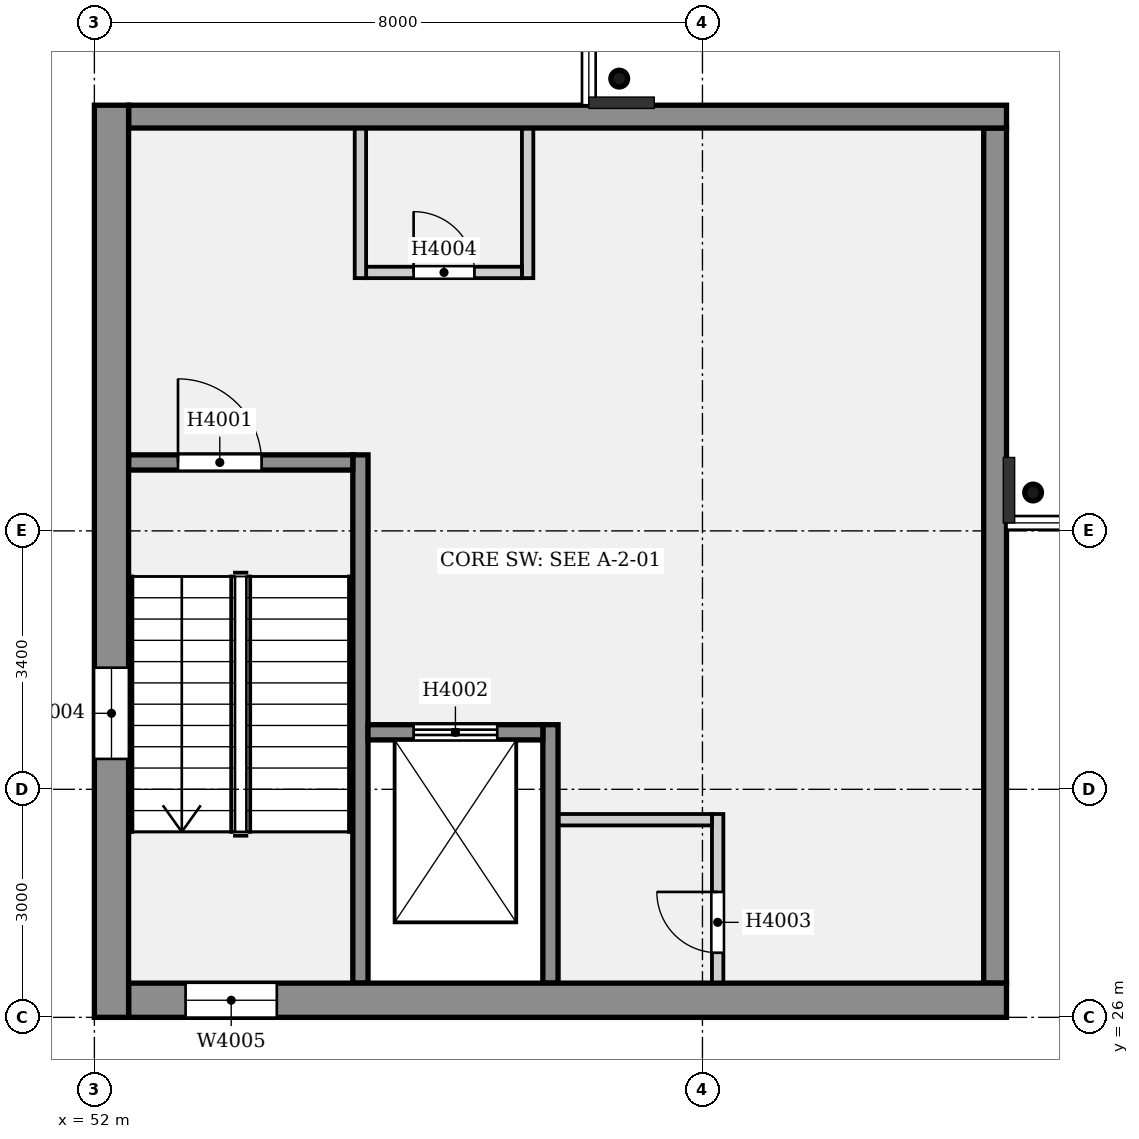
"""IFC4 building model, lengths in metres.
Left out: names, types, materials, properties, quantities, classifications, styles, units other than length and angle.
Written with IfcOpenShell. Run it as: python <this file> out.ifc"""

import sys

from ifc_helpers import new_model, si_unit, direction, frame, frame_2d, origin, origin_2d, place, context, subcontext, project, spatial, rectangle, hollow_circle, extrude, element, fill, save


model = new_model("IFC4")
c1 = context("Model", 3, precision=1e-05, world=origin(), true_north=direction((0.0, 1.0)))
c2 = subcontext(c1, "Body", "Model", "MODEL_VIEW")
j1 = project(units=[si_unit("LENGTHUNIT", "METRE"), si_unit("PLANEANGLEUNIT", "RADIAN")], contexts=[c1])
p1 = place(None, origin())
s1 = spatial("IfcSite", under=j1, at=p1, CompositionType="ELEMENT")
p2 = place(p1, origin())
s2 = spatial("IfcBuilding", under=s1, at=p2, CompositionType="ELEMENT")
p3 = place(p2, frame((0.0, 0.0, 18.2)))
s3 = spatial("IfcBuildingStorey", under=s2, at=p3, CompositionType="ELEMENT", Elevation=18.2)
p4 = place(p3, frame((52.225, 26.0, 0.0), z_axis=(0.0, 0.0, 1.0), x_axis=(0.0, 1.0, 0.0)))
e1 = element("IfcWall", 1, at=p4, inside=s3, PredefinedType="ELEMENTEDWALL", context=c2, shape_type="SweptSolid", body=[
    extrude(rectangle(XDim=12.0, YDim=0.45, at=frame_2d((6.0, 0.0))), origin(), (0.0, 0.0, 1.0), 4.4),
])
p5 = place(p4, frame((3.4, 0.0, 0.6)))
e2 = element("IfcOpeningElement", 2, at=p5, cuts=e1, PredefinedType="OPENING", context=c2, shape_type="SweptSolid", body=[
    extrude(rectangle(XDim=1.2, YDim=3.0, at=frame_2d((0.6, 1.5))), frame((0.0, 0.235, 0.0), z_axis=(0.0, -1.0, 0.0), x_axis=(1.0, 0.0, 0.0)), (0.0, 0.0, 1.0), 0.47),
])
p6 = place(p3, frame((52.45, 26.225, 0.0), z_axis=(0.0, 0.0, 1.0), x_axis=(1.0, 0.0, 0.0)))
e3 = element("IfcWall", 3, at=p6, inside=s3, PredefinedType="ELEMENTEDWALL", context=c2, shape_type="SweptSolid", body=[
    extrude(rectangle(XDim=11.55, YDim=0.45, at=frame_2d((5.775, 0.0))), origin(), (0.0, 0.0, 1.0), 4.4),
])
p7 = place(p6, frame((0.75, 0.0, 0.6)))
e4 = element("IfcOpeningElement", 4, at=p7, cuts=e3, PredefinedType="OPENING", context=c2, shape_type="SweptSolid", body=[
    extrude(rectangle(XDim=1.2, YDim=3.0, at=frame_2d((0.6, 1.5))), frame((0.0, 0.235, 0.0), z_axis=(0.0, -1.0, 0.0), x_axis=(1.0, 0.0, 0.0)), (0.0, 0.0, 1.0), 0.47),
])
p8 = place(p3, frame((63.85, 26.45, 0.0), z_axis=(0.0, 0.0, 1.0), x_axis=(0.0, 1.0, 0.0)))
e5 = element("IfcWall", 5, at=p8, inside=s3, PredefinedType="SOLIDWALL", context=c2, shape_type="SweptSolid", body=[
    extrude(rectangle(XDim=11.25, YDim=0.3, at=frame_2d((5.625, 0.0))), origin(), (0.0, 0.0, 1.0), 4.4),
])
p9 = place(p3, frame((52.45, 37.85, 0.0), z_axis=(0.0, 0.0, 1.0), x_axis=(1.0, 0.0, 0.0)))
e6 = element("IfcWall", 6, at=p9, inside=s3, PredefinedType="SOLIDWALL", context=c2, shape_type="SweptSolid", body=[
    extrude(rectangle(XDim=11.55, YDim=0.3, at=frame_2d((5.775, 0.0))), origin(), (0.0, 0.0, 1.0), 4.4),
])
for number, where, z_axis, x_axis in (
    (7, (64.35, 32.905, 0.0), (0.0, 0.199, 0.98), (-1.0, 0.0, 0.0)),
    (8, (58.905, 38.35, 0.0), (0.199, 0.0, 0.98), (0.0, 1.0, 0.0)),
):
    element("IfcColumn", number, at=place(p3, frame(where, z_axis=z_axis, x_axis=x_axis)), inside=s3, PredefinedType="COLUMN", context=c2, shape_type="SweptSolid", body=[
        extrude(hollow_circle(Radius=0.11, WallThickness=0.013, at=origin_2d()), origin(), (0.0, 0.0, 1.0), 3.776),
    ])
p10 = place(p3, frame((55.5, 26.45, 0.0), z_axis=(0.0, 0.0, 1.0), x_axis=(0.0, 1.0, 0.0)))
e9 = element("IfcWall", 9, at=p10, inside=s3, PredefinedType="SOLIDWALL", context=c2, shape_type="SweptSolid", body=[
    extrude(rectangle(XDim=6.95, YDim=0.2, at=frame_2d((3.475, 0.0))), origin(), (0.0, 0.0, 1.0), 4.4),
])
p11 = place(p3, frame((52.45, 33.3, 0.0), z_axis=(0.0, 0.0, 1.0), x_axis=(1.0, 0.0, 0.0)))
e10 = element("IfcWall", 10, at=p11, inside=s3, PredefinedType="SOLIDWALL", context=c2, shape_type="SweptSolid", body=[
    extrude(rectangle(XDim=2.95, YDim=0.2, at=frame_2d((1.475, 0.0))), origin(), (0.0, 0.0, 1.0), 4.4),
])
p12 = place(p11, frame((0.65, 0.0, 0.0)))
e11 = element("IfcOpeningElement", 11, at=p12, cuts=e10, PredefinedType="OPENING", context=c2, shape_type="SweptSolid", body=[
    extrude(rectangle(XDim=1.1, YDim=2.1, at=frame_2d((0.55, 1.05))), frame((0.0, 0.11, 0.0), z_axis=(0.0, -1.0, 0.0), x_axis=(1.0, 0.0, 0.0)), (0.0, 0.0, 1.0), 0.22),
])
p13 = place(p3, frame((58.0, 26.45, 0.0), z_axis=(0.0, 0.0, 1.0), x_axis=(0.0, 1.0, 0.0)))
e12 = element("IfcWall", 12, at=p13, inside=s3, PredefinedType="SOLIDWALL", context=c2, shape_type="SweptSolid", body=[
    extrude(rectangle(XDim=3.4, YDim=0.2, at=frame_2d((1.7, 0.0))), origin(), (0.0, 0.0, 1.0), 4.4),
])
p14 = place(p3, frame((55.6, 29.75, 0.0), z_axis=(0.0, 0.0, 1.0), x_axis=(1.0, 0.0, 0.0)))
e13 = element("IfcWall", 13, at=p14, inside=s3, PredefinedType="SOLIDWALL", context=c2, shape_type="SweptSolid", body=[
    extrude(rectangle(XDim=2.3, YDim=0.2, at=frame_2d((1.15, 0.0))), origin(), (0.0, 0.0, 1.0), 4.4),
])
p15 = place(p14, frame((0.6, 0.0, 0.0)))
e14 = element("IfcOpeningElement", 14, at=p15, cuts=e13, PredefinedType="OPENING", context=c2, shape_type="SweptSolid", body=[
    extrude(rectangle(XDim=1.1, YDim=2.1, at=frame_2d((0.55, 1.05))), frame((0.0, 0.11, 0.0), z_axis=(0.0, -1.0, 0.0), x_axis=(1.0, 0.0, 0.0)), (0.0, 0.0, 1.0), 0.22),
])
p16 = place(p3, frame((58.1, 28.6, 0.0), z_axis=(0.0, 0.0, 1.0), x_axis=(1.0, 0.0, 0.0)))
e15 = element("IfcWall", 15, at=p16, inside=s3, PredefinedType="PARTITIONING", context=c2, shape_type="SweptSolid", body=[
    extrude(rectangle(XDim=2.025, YDim=0.15, at=frame_2d((1.012, 0.0))), origin(), (0.0, 0.0, 1.0), 4.15),
])
p17 = place(p3, frame((60.2, 26.45, 0.0), z_axis=(0.0, 0.0, 1.0), x_axis=(0.0, 1.0, 0.0)))
e16 = element("IfcWall", 16, at=p17, inside=s3, PredefinedType="PARTITIONING", context=c2, shape_type="SweptSolid", body=[
    extrude(rectangle(XDim=2.225, YDim=0.15, at=frame_2d((1.113, 0.0))), origin(), (0.0, 0.0, 1.0), 4.15),
])
p18 = place(p17, frame((0.4, 0.0, 0.0)))
e17 = element("IfcOpeningElement", 17, at=p18, cuts=e16, PredefinedType="OPENING", context=c2, shape_type="SweptSolid", body=[
    extrude(rectangle(XDim=0.8, YDim=2.1, at=frame_2d((0.4, 1.05))), frame((0.0, 0.085, 0.0), z_axis=(0.0, -1.0, 0.0), x_axis=(1.0, 0.0, 0.0)), (0.0, 0.0, 1.0), 0.17),
])
p19 = place(p3, frame((55.575, 35.8, 0.0), z_axis=(0.0, 0.0, 1.0), x_axis=(1.0, 0.0, 0.0)))
e18 = element("IfcWall", 18, at=p19, inside=s3, PredefinedType="PARTITIONING", context=c2, shape_type="SweptSolid", body=[
    extrude(rectangle(XDim=2.05, YDim=0.15, at=frame_2d((1.025, 0.0))), origin(), (0.0, 0.0, 1.0), 4.15),
])
p20 = place(p19, frame((0.625, 0.0, 0.0)))
e19 = element("IfcOpeningElement", 19, at=p20, cuts=e18, PredefinedType="OPENING", context=c2, shape_type="SweptSolid", body=[
    extrude(rectangle(XDim=0.8, YDim=2.1, at=frame_2d((0.4, 1.05))), frame((0.0, 0.085, 0.0), z_axis=(0.0, -1.0, 0.0), x_axis=(1.0, 0.0, 0.0)), (0.0, 0.0, 1.0), 0.17),
])
for number, where, z_axis, x_axis in (
    (20, (55.5, 35.725, 0.0), (0.0, 0.0, 1.0), (0.0, 1.0, 0.0)),
    (21, (57.7, 35.725, 0.0), (0.0, 0.0, 1.0), (0.0, 1.0, 0.0)),
):
    element("IfcWall", number, at=place(p3, frame(where, z_axis=z_axis, x_axis=x_axis)), inside=s3, PredefinedType="PARTITIONING", context=c2, shape_type="SweptSolid", body=[
        extrude(rectangle(XDim=1.975, YDim=0.15, at=frame_2d((0.987, 0.0))), origin(), (0.0, 0.0, 1.0), 4.15),
    ])
p21 = place(p12, origin())
e22 = element("IfcDoor", 22, at=p21, inside=s3, OperationType="SINGLE_SWING_LEFT", PredefinedType="DOOR", context=c2, shape_type="SweptSolid", body=[
    extrude(rectangle(XDim=1.1, YDim=2.1, at=frame_2d((0.55, 1.05))), frame((0.0, 0.025, 0.0), z_axis=(0.0, -1.0, 0.0), x_axis=(1.0, 0.0, 0.0)), (0.0, 0.0, 1.0), 0.05),
])
fill(e11, e22)
p22 = place(p15, origin())
e23 = element("IfcDoor", 23, at=p22, inside=s3, OperationType="DOUBLE_DOOR_SLIDING", PredefinedType="DOOR", context=c2, shape_type="SweptSolid", body=[
    extrude(rectangle(XDim=1.1, YDim=2.1, at=frame_2d((0.55, 1.05))), frame((0.0, 0.025, 0.0), z_axis=(0.0, -1.0, 0.0), x_axis=(1.0, 0.0, 0.0)), (0.0, 0.0, 1.0), 0.05),
])
fill(e14, e23)
p23 = place(p18, origin())
e24 = element("IfcDoor", 24, at=p23, inside=s3, OperationType="SINGLE_SWING_RIGHT", PredefinedType="DOOR", context=c2, shape_type="SweptSolid", body=[
    extrude(rectangle(XDim=0.8, YDim=2.1, at=frame_2d((0.4, 1.05))), frame((0.0, 0.025, 0.0), z_axis=(0.0, -1.0, 0.0), x_axis=(1.0, 0.0, 0.0)), (0.0, 0.0, 1.0), 0.05),
])
fill(e17, e24)
p24 = place(p20, origin())
e25 = element("IfcDoor", 25, at=p24, inside=s3, OperationType="SINGLE_SWING_LEFT", PredefinedType="DOOR", context=c2, shape_type="SweptSolid", body=[
    extrude(rectangle(XDim=0.8, YDim=2.1, at=frame_2d((0.4, 1.05))), frame((0.0, 0.025, 0.0), z_axis=(0.0, -1.0, 0.0), x_axis=(1.0, 0.0, 0.0)), (0.0, 0.0, 1.0), 0.05),
])
fill(e19, e25)
p25 = place(p5, origin())
e26 = element("IfcWindow", 26, at=p25, inside=s3, PartitioningType="SINGLE_PANEL", PredefinedType="WINDOW", context=c2, shape_type="SweptSolid", body=[
    extrude(rectangle(XDim=1.2, YDim=3.0, at=frame_2d((0.6, 1.5))), frame((0.0, 0.03, 0.0), z_axis=(0.0, -1.0, 0.0), x_axis=(1.0, 0.0, 0.0)), (0.0, 0.0, 1.0), 0.06),
])
fill(e2, e26)
p26 = place(p7, origin())
e27 = element("IfcWindow", 27, at=p26, inside=s3, PartitioningType="SINGLE_PANEL", PredefinedType="WINDOW", context=c2, shape_type="SweptSolid", body=[
    extrude(rectangle(XDim=1.2, YDim=3.0, at=frame_2d((0.6, 1.5))), frame((0.0, 0.03, 0.0), z_axis=(0.0, -1.0, 0.0), x_axis=(1.0, 0.0, 0.0)), (0.0, 0.0, 1.0), 0.06),
])
fill(e4, e27)
save(model, sys.argv[1])
